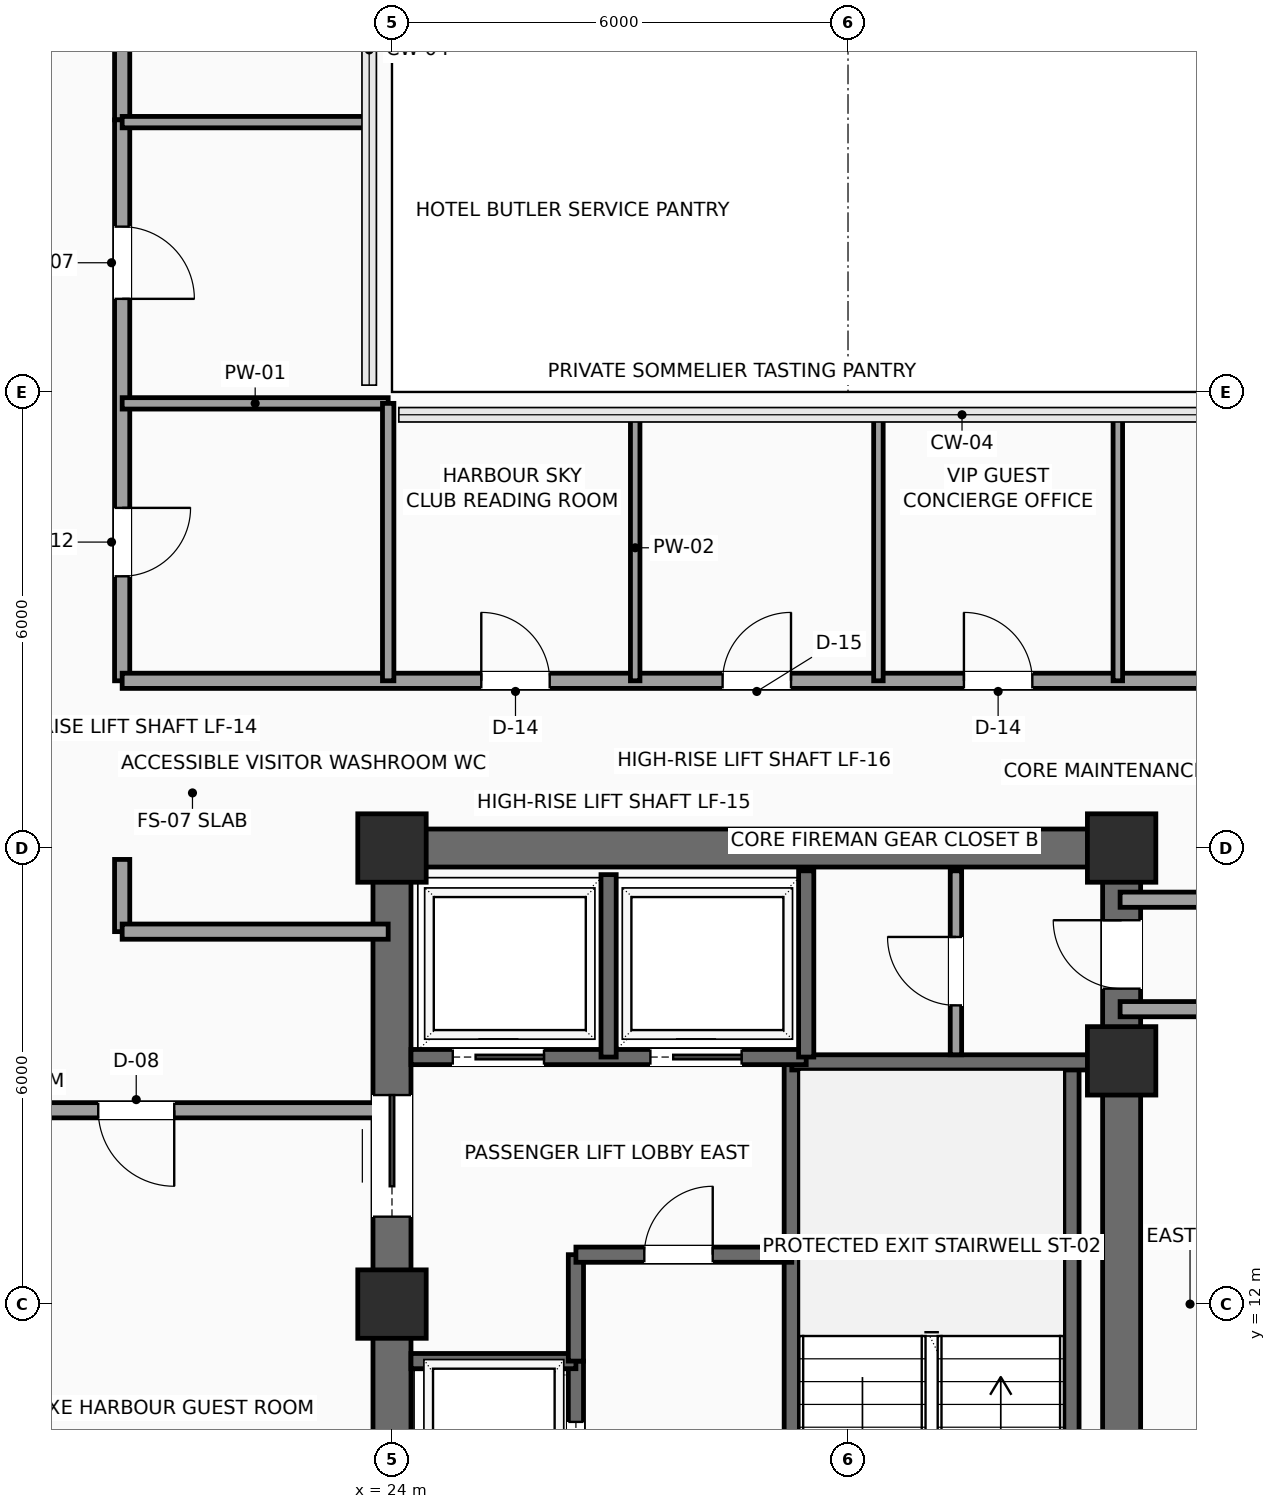
"""IFC4 building model, lengths in metres.
Left out: names, types, materials, properties, quantities, classifications, styles, units other than length and angle.
Written with IfcOpenShell. Run it as: python <this file> out.ifc"""

import sys

from ifc_helpers import new_model, si_unit, direction, frame, frame_2d, origin, origin_2d, place, context, subcontext, project, spatial, rectangle, extrude, element, fill, save


model = new_model("IFC4")
c1 = context("Model", 3, precision=1e-05, world=origin(), true_north=direction((0.0, 1.0)))
c2 = subcontext(c1, "Body", "Model", "MODEL_VIEW")
j1 = project(units=[si_unit("LENGTHUNIT", "METRE"), si_unit("PLANEANGLEUNIT", "RADIAN")], contexts=[c1])
p1 = place(None, origin())
s1 = spatial("IfcSite", under=j1, at=p1, CompositionType="ELEMENT")
p2 = place(p1, origin())
s2 = spatial("IfcBuilding", under=s1, at=p2, CompositionType="ELEMENT")
p3 = place(p2, frame((0.0, 0.0, 208.65)))
s3 = spatial("IfcBuildingStorey", under=s2, at=p3, CompositionType="ELEMENT", Elevation=208.65)
for number, where, z_axis, x_axis in (
    (1, (24.0, 12.0, 0.0), (0.0, 0.0, 1.0), (1.0, 0.0, 0.0)),
    (2, (24.0, 18.0, 0.0), (0.0, 0.0, 1.0), (1.0, 0.0, 0.0)),
    (3, (33.6, 15.2, 0.0), (0.0, 0.0, 1.0), (1.0, 0.0, 0.0)),
    (4, (33.6, 18.0, 0.0), (0.0, 0.0, 1.0), (1.0, 0.0, 0.0)),
):
    element("IfcColumn", number, at=place(p3, frame(where, z_axis=z_axis, x_axis=x_axis)), inside=s3, PredefinedType="COLUMN", context=c2, shape_type="SweptSolid", body=[
        extrude(rectangle(XDim=0.9, YDim=0.9, at=origin_2d()), origin(), (0.0, 0.0, 1.0), 3.75),
    ])
p4 = place(p3, frame((24.0, 18.0, 0.0), z_axis=(0.0, 0.0, 1.0), x_axis=(1.0, 0.0, 0.0)))
e5 = element("IfcWall", 5, at=p4, inside=s3, PredefinedType="SHEAR", context=c2, shape_type="SweptSolid", body=[
    extrude(rectangle(XDim=9.6, YDim=0.5, at=frame_2d((4.8, 0.0))), origin(), (0.0, 0.0, 1.0), 3.54),
])
p5 = place(p3, frame((24.0, 6.0, 0.0), z_axis=(0.0, 0.0, 1.0), x_axis=(0.0, 1.0, 0.0)))
e6 = element("IfcWall", 6, at=p5, inside=s3, PredefinedType="SHEAR", context=c2, shape_type="SweptSolid", body=[
    extrude(rectangle(XDim=12.0, YDim=0.5, at=frame_2d((6.0, 0.0))), origin(), (0.0, 0.0, 1.0), 3.54),
])
p6 = place(p5, frame((7.15, 0.0, 0.0)))
e7 = element("IfcOpeningElement", 7, at=p6, cuts=e6, PredefinedType="OPENING", context=c2, shape_type="SweptSolid", body=[
    extrude(rectangle(XDim=1.6, YDim=2.3, at=frame_2d((0.8, 1.15))), frame((0.0, 0.26, 0.0), z_axis=(0.0, -1.0, 0.0), x_axis=(1.0, 0.0, 0.0)), (0.0, 0.0, 1.0), 0.52),
])
p7 = place(p3, frame((33.6, 6.0, 0.0), z_axis=(0.0, 0.0, 1.0), x_axis=(0.0, 1.0, 0.0)))
e8 = element("IfcWall", 8, at=p7, inside=s3, PredefinedType="SHEAR", context=c2, shape_type="SweptSolid", body=[
    extrude(rectangle(XDim=12.0, YDim=0.5, at=frame_2d((6.0, 0.0))), origin(), (0.0, 0.0, 1.0), 3.54),
])
p8 = place(p7, frame((10.15, 0.0, 0.0)))
e9 = element("IfcOpeningElement", 9, at=p8, cuts=e8, PredefinedType="OPENING", context=c2, shape_type="SweptSolid", body=[
    extrude(rectangle(XDim=0.9, YDim=2.15, at=frame_2d((0.45, 1.075))), frame((0.0, 0.26, 0.0), z_axis=(0.0, -1.0, 0.0), x_axis=(1.0, 0.0, 0.0)), (0.0, 0.0, 1.0), 0.52),
])
p9 = place(p3, frame((29.26, 6.3, 0.0), z_axis=(0.0, 0.0, 1.0), x_axis=(0.0, 1.0, 0.0)))
e10 = element("IfcWall", 10, at=p9, inside=s3, PredefinedType="SHEAR", context=c2, shape_type="SweptSolid", body=[
    extrude(rectangle(XDim=8.88, YDim=0.2, at=frame_2d((4.44, 0.0))), origin(), (0.0, 0.0, 1.0), 3.54),
])
p10 = place(p9, frame((0.35, 0.0, 0.0)))
e11 = element("IfcOpeningElement", 11, at=p10, cuts=e10, PredefinedType="OPENING", context=c2, shape_type="SweptSolid", body=[
    extrude(rectangle(XDim=1.1, YDim=2.2, at=frame_2d((0.55, 1.1))), frame((0.0, 0.11, 0.0), z_axis=(0.0, -1.0, 0.0), x_axis=(1.0, 0.0, 0.0)), (0.0, 0.0, 1.0), 0.22),
])
p11 = place(p3, frame((32.94, 6.3, 0.0), z_axis=(0.0, 0.0, 1.0), x_axis=(0.0, 1.0, 0.0)))
e12 = element("IfcWall", 12, at=p11, inside=s3, PredefinedType="SHEAR", context=c2, shape_type="SweptSolid", body=[
    extrude(rectangle(XDim=8.88, YDim=0.2, at=frame_2d((4.44, 0.0))), origin(), (0.0, 0.0, 1.0), 3.54),
])
p12 = place(p3, frame((29.26, 15.18, 0.0), z_axis=(0.0, 0.0, 1.0), x_axis=(1.0, 0.0, 0.0)))
e13 = element("IfcWall", 13, at=p12, inside=s3, PredefinedType="SHEAR", context=c2, shape_type="SweptSolid", body=[
    extrude(rectangle(XDim=4.04, YDim=0.2, at=frame_2d((2.02, 0.0))), origin(), (0.0, 0.0, 1.0), 3.54),
])
p13 = place(p3, frame((26.42, 6.3, 0.0), z_axis=(0.0, 0.0, 1.0), x_axis=(0.0, 1.0, 0.0)))
e14 = element("IfcWall", 14, at=p13, inside=s3, PredefinedType="SHEAR", context=c2, shape_type="SweptSolid", body=[
    extrude(rectangle(XDim=4.95, YDim=0.2, at=frame_2d((2.475, 0.0))), origin(), (0.0, 0.0, 1.0), 3.54),
])
p14 = place(p13, frame((0.65, 0.0, 0.0)))
e15 = element("IfcOpeningElement", 15, at=p14, cuts=e14, PredefinedType="OPENING", context=c2, shape_type="SweptSolid", body=[
    extrude(rectangle(XDim=1.1, YDim=2.2, at=frame_2d((0.55, 1.1))), frame((0.0, 0.11, 0.0), z_axis=(0.0, -1.0, 0.0), x_axis=(1.0, 0.0, 0.0)), (0.0, 0.0, 1.0), 0.22),
])
p15 = place(p13, frame((3.05, 0.0, 0.0)))
e16 = element("IfcOpeningElement", 16, at=p15, cuts=e14, PredefinedType="OPENING", context=c2, shape_type="SweptSolid", body=[
    extrude(rectangle(XDim=1.1, YDim=2.2, at=frame_2d((0.55, 1.1))), frame((0.0, 0.11, 0.0), z_axis=(0.0, -1.0, 0.0), x_axis=(1.0, 0.0, 0.0)), (0.0, 0.0, 1.0), 0.22),
])
p16 = place(p3, frame((24.25, 11.25, 0.0), z_axis=(0.0, 0.0, 1.0), x_axis=(1.0, 0.0, 0.0)))
e17 = element("IfcWall", 17, at=p16, inside=s3, PredefinedType="SHEAR", context=c2, shape_type="SweptSolid", body=[
    extrude(rectangle(XDim=2.17, YDim=0.2, at=frame_2d((1.085, 0.0))), origin(), (0.0, 0.0, 1.0), 3.54),
])
p17 = place(p3, frame((26.42, 11.25, 0.0), z_axis=(0.0, 0.0, 1.0), x_axis=(0.0, 1.0, 0.0)))
e18 = element("IfcWall", 18, at=p17, inside=s3, PredefinedType="SHEAR", context=c2, shape_type="SweptSolid", body=[
    extrude(rectangle(XDim=1.4, YDim=0.2, at=frame_2d((0.7, 0.0))), origin(), (0.0, 0.0, 1.0), 3.54),
])
p18 = place(p3, frame((26.42, 12.65, 0.0), z_axis=(0.0, 0.0, 1.0), x_axis=(1.0, 0.0, 0.0)))
e19 = element("IfcWall", 19, at=p18, inside=s3, PredefinedType="SHEAR", context=c2, shape_type="SweptSolid", body=[
    extrude(rectangle(XDim=2.84, YDim=0.2, at=frame_2d((1.42, 0.0))), origin(), (0.0, 0.0, 1.0), 3.54),
])
p19 = place(p18, frame((0.9, 0.0, 0.0)))
e20 = element("IfcOpeningElement", 20, at=p19, cuts=e19, PredefinedType="OPENING", context=c2, shape_type="SweptSolid", body=[
    extrude(rectangle(XDim=0.9, YDim=2.15, at=frame_2d((0.45, 1.075))), frame((0.0, 0.11, 0.0), z_axis=(0.0, -1.0, 0.0), x_axis=(1.0, 0.0, 0.0)), (0.0, 0.0, 1.0), 0.22),
])
p20 = place(p3, frame((24.25, 15.25, 0.0), z_axis=(0.0, 0.0, 1.0), x_axis=(1.0, 0.0, 0.0)))
e21 = element("IfcWall", 21, at=p20, inside=s3, PredefinedType="SHEAR", context=c2, shape_type="SweptSolid", body=[
    extrude(rectangle(XDim=5.2, YDim=0.2, at=frame_2d((2.6, 0.0))), origin(), (0.0, 0.0, 1.0), 3.54),
])
p21 = place(p20, frame((0.55, 0.0, 0.0)))
e22 = element("IfcOpeningElement", 22, at=p21, cuts=e21, PredefinedType="OPENING", context=c2, shape_type="SweptSolid", body=[
    extrude(rectangle(XDim=1.2, YDim=2.2, at=frame_2d((0.6, 1.1))), frame((0.0, 0.11, 0.0), z_axis=(0.0, -1.0, 0.0), x_axis=(1.0, 0.0, 0.0)), (0.0, 0.0, 1.0), 0.22),
])
p22 = place(p20, frame((3.15, 0.0, 0.0)))
e23 = element("IfcOpeningElement", 23, at=p22, cuts=e21, PredefinedType="OPENING", context=c2, shape_type="SweptSolid", body=[
    extrude(rectangle(XDim=1.2, YDim=2.2, at=frame_2d((0.6, 1.1))), frame((0.0, 0.11, 0.0), z_axis=(0.0, -1.0, 0.0), x_axis=(1.0, 0.0, 0.0)), (0.0, 0.0, 1.0), 0.22),
])
p23 = place(p3, frame((26.85, 15.25, 0.0), z_axis=(0.0, 0.0, 1.0), x_axis=(0.0, 1.0, 0.0)))
e24 = element("IfcWall", 24, at=p23, inside=s3, PredefinedType="SHEAR", context=c2, shape_type="SweptSolid", body=[
    extrude(rectangle(XDim=2.4, YDim=0.2, at=frame_2d((1.2, 0.0))), origin(), (0.0, 0.0, 1.0), 3.54),
])
p24 = place(p3, frame((29.45, 15.25, 0.0), z_axis=(0.0, 0.0, 1.0), x_axis=(0.0, 1.0, 0.0)))
e25 = element("IfcWall", 25, at=p24, inside=s3, PredefinedType="SHEAR", context=c2, shape_type="SweptSolid", body=[
    extrude(rectangle(XDim=2.45, YDim=0.2, at=frame_2d((1.225, 0.0))), origin(), (0.0, 0.0, 1.0), 3.54),
])
p25 = place(p3, frame((31.42, 15.28, 0.0), z_axis=(0.0, 0.0, 1.0), x_axis=(0.0, 1.0, 0.0)))
e26 = element("IfcWall", 26, at=p25, inside=s3, PredefinedType="PARTITIONING", context=c2, shape_type="SweptSolid", body=[
    extrude(rectangle(XDim=2.42, YDim=0.15, at=frame_2d((1.21, 0.0))), origin(), (0.0, 0.0, 1.0), 3.54),
])
p26 = place(p25, frame((0.65, 0.0, 0.0)))
e27 = element("IfcOpeningElement", 27, at=p26, cuts=e26, PredefinedType="OPENING", context=c2, shape_type="SweptSolid", body=[
    extrude(rectangle(XDim=0.9, YDim=2.15, at=frame_2d((0.45, 1.075))), frame((0.0, 0.085, 0.0), z_axis=(0.0, -1.0, 0.0), x_axis=(1.0, 0.0, 0.0)), (0.0, 0.0, 1.0), 0.17),
])
p27 = place(p3, frame((20.45, 30.25, 0.0), z_axis=(0.0, 0.0, 1.0), x_axis=(0.0, -1.0, 0.0)))
e28 = element("IfcWall", 28, at=p27, inside=s3, PredefinedType="PARTITIONING", context=c2, shape_type="SweptSolid", body=[
    extrude(rectangle(XDim=2.67, YDim=0.2, at=frame_2d((1.335, 0.0))), origin(), (0.0, 0.0, 1.0), 3.54),
])
p28 = place(p3, frame((20.45, 27.58, 0.0), z_axis=(0.0, 0.0, 1.0), x_axis=(0.0, -1.0, 0.0)))
e29 = element("IfcWall", 29, at=p28, inside=s3, PredefinedType="PARTITIONING", context=c2, shape_type="SweptSolid", body=[
    extrude(rectangle(XDim=7.38, YDim=0.2, at=frame_2d((3.69, 0.0))), origin(), (0.0, 0.0, 1.0), 3.54),
])
p29 = place(p28, frame((5.105, 0.0, 0.0)))
e30 = element("IfcOpeningElement", 30, at=p29, cuts=e29, PredefinedType="OPENING", context=c2, shape_type="SweptSolid", body=[
    extrude(rectangle(XDim=0.9, YDim=2.1, at=frame_2d((0.45, 1.05))), frame((0.0, 0.11, 0.0), z_axis=(0.0, -1.0, 0.0), x_axis=(1.0, 0.0, 0.0)), (0.0, 0.0, 1.0), 0.22),
])
p30 = place(p28, frame((1.405, 0.0, 0.0)))
e31 = element("IfcOpeningElement", 31, at=p30, cuts=e29, PredefinedType="OPENING", context=c2, shape_type="SweptSolid", body=[
    extrude(rectangle(XDim=0.95, YDim=2.15, at=frame_2d((0.475, 1.075))), frame((0.0, 0.11, 0.0), z_axis=(0.0, -1.0, 0.0), x_axis=(1.0, 0.0, 0.0)), (0.0, 0.0, 1.0), 0.22),
])
p31 = place(p3, frame((20.45, 20.2, 0.0), z_axis=(0.0, 0.0, 1.0), x_axis=(1.0, 0.0, 0.0)))
e32 = element("IfcWall", 32, at=p31, inside=s3, PredefinedType="PARTITIONING", context=c2, shape_type="SweptSolid", body=[
    extrude(rectangle(XDim=15.7, YDim=0.2, at=frame_2d((7.85, 0.0))), origin(), (0.0, 0.0, 1.0), 3.54),
])
p32 = place(p31, frame((4.725, 0.0, 0.0)))
e33 = element("IfcOpeningElement", 33, at=p32, cuts=e32, PredefinedType="OPENING", context=c2, shape_type="SweptSolid", body=[
    extrude(rectangle(XDim=0.9, YDim=2.1, at=frame_2d((0.45, 1.05))), frame((0.0, 0.11, 0.0), z_axis=(0.0, -1.0, 0.0), x_axis=(1.0, 0.0, 0.0)), (0.0, 0.0, 1.0), 0.22),
])
p33 = place(p31, frame((7.9, 0.0, 0.0)))
e34 = element("IfcOpeningElement", 34, at=p33, cuts=e32, PredefinedType="OPENING", context=c2, shape_type="SweptSolid", body=[
    extrude(rectangle(XDim=0.9, YDim=2.1, at=frame_2d((0.45, 1.05))), frame((0.0, 0.11, 0.0), z_axis=(0.0, -1.0, 0.0), x_axis=(1.0, 0.0, 0.0)), (0.0, 0.0, 1.0), 0.22),
])
p34 = place(p31, frame((11.075, 0.0, 0.0)))
e35 = element("IfcOpeningElement", 35, at=p34, cuts=e32, PredefinedType="OPENING", context=c2, shape_type="SweptSolid", body=[
    extrude(rectangle(XDim=0.9, YDim=2.1, at=frame_2d((0.45, 1.05))), frame((0.0, 0.11, 0.0), z_axis=(0.0, -1.0, 0.0), x_axis=(1.0, 0.0, 0.0)), (0.0, 0.0, 1.0), 0.22),
])
for number, where, z_axis, x_axis in (
    (36, (36.15, 15.88, 0.0), (0.0, 0.0, 1.0), (-1.0, 0.0, 0.0)),
    (37, (33.58, 17.32, 0.0), (0.0, 0.0, 1.0), (1.0, 0.0, 0.0)),
):
    element("IfcWall", number, at=place(p3, frame(where, z_axis=z_axis, x_axis=x_axis)), inside=s3, PredefinedType="PARTITIONING", context=c2, shape_type="SweptSolid", body=[
        extrude(rectangle(XDim=2.57, YDim=0.2, at=frame_2d((1.285, 0.0))), origin(), (0.0, 0.0, 1.0), 3.54),
    ])
p35 = place(p3, frame((20.45, 17.85, 0.0), z_axis=(0.0, 0.0, 1.0), x_axis=(0.0, -1.0, 0.0)))
e38 = element("IfcWall", 38, at=p35, inside=s3, PredefinedType="PARTITIONING", context=c2, shape_type="SweptSolid", body=[
    extrude(rectangle(XDim=0.95, YDim=0.2, at=frame_2d((0.475, 0.0))), origin(), (0.0, 0.0, 1.0), 3.54),
])
p36 = place(p3, frame((20.45, 16.9, 0.0), z_axis=(0.0, 0.0, 1.0), x_axis=(1.0, 0.0, 0.0)))
e39 = element("IfcWall", 39, at=p36, inside=s3, PredefinedType="PARTITIONING", context=c2, shape_type="SweptSolid", body=[
    extrude(rectangle(XDim=3.5, YDim=0.2, at=frame_2d((1.75, 0.0))), origin(), (0.0, 0.0, 1.0), 3.54),
])
p37 = place(p3, frame((23.95, 14.55, 0.0), z_axis=(0.0, 0.0, 1.0), x_axis=(-1.0, 0.0, 0.0)))
e40 = element("IfcWall", 40, at=p37, inside=s3, PredefinedType="PARTITIONING", context=c2, shape_type="SweptSolid", body=[
    extrude(rectangle(XDim=9.0, YDim=0.2, at=frame_2d((4.5, 0.0))), origin(), (0.0, 0.0, 1.0), 3.54),
])
p38 = place(p37, frame((2.815, 0.0, 0.0)))
e41 = element("IfcOpeningElement", 41, at=p38, cuts=e40, PredefinedType="OPENING", context=c2, shape_type="SweptSolid", body=[
    extrude(rectangle(XDim=1.0, YDim=2.2, at=frame_2d((0.5, 1.1))), frame((0.0, 0.11, 0.0), z_axis=(0.0, -1.0, 0.0), x_axis=(1.0, 0.0, 0.0)), (0.0, 0.0, 1.0), 0.22),
])
p39 = place(p3, frame((20.45, 23.85, 0.0), z_axis=(0.0, 0.0, 1.0), x_axis=(1.0, 0.0, 0.0)))
e42 = element("IfcWall", 42, at=p39, inside=s3, PredefinedType="PARTITIONING", context=c2, shape_type="SweptSolid", body=[
    extrude(rectangle(XDim=3.5, YDim=0.15, at=frame_2d((1.75, 0.0))), origin(), (0.0, 0.0, 1.0), 3.54),
])
p40 = place(p3, frame((23.95, 20.2, 0.0), z_axis=(0.0, 0.0, 1.0), x_axis=(0.0, 1.0, 0.0)))
e43 = element("IfcWall", 43, at=p40, inside=s3, PredefinedType="PARTITIONING", context=c2, shape_type="SweptSolid", body=[
    extrude(rectangle(XDim=3.65, YDim=0.15, at=frame_2d((1.825, 0.0))), origin(), (0.0, 0.0, 1.0), 3.54),
])
p41 = place(p3, frame((20.45, 27.55, 0.0), z_axis=(0.0, 0.0, 1.0), x_axis=(1.0, 0.0, 0.0)))
e44 = element("IfcWall", 44, at=p41, inside=s3, PredefinedType="PARTITIONING", context=c2, shape_type="SweptSolid", body=[
    extrude(rectangle(XDim=3.25, YDim=0.15, at=frame_2d((1.625, 0.0))), origin(), (0.0, 0.0, 1.0), 3.54),
])
for number, where, z_axis, x_axis in (
    (45, (27.2, 20.2, 0.0), (0.0, 0.0, 1.0), (0.0, 1.0, 0.0)),
    (46, (30.4, 20.2, 0.0), (0.0, 0.0, 1.0), (0.0, 1.0, 0.0)),
    (47, (33.55, 20.2, 0.0), (0.0, 0.0, 1.0), (0.0, 1.0, 0.0)),
):
    element("IfcWall", number, at=place(p3, frame(where, z_axis=z_axis, x_axis=x_axis)), inside=s3, PredefinedType="PARTITIONING", context=c2, shape_type="SweptSolid", body=[
        extrude(rectangle(XDim=3.5, YDim=0.125, at=frame_2d((1.75, 0.0))), origin(), (0.0, 0.0, 1.0), 3.54),
    ])
p42 = place(p6, origin())
e48 = element("IfcDoor", 48, at=p42, inside=s3, OperationType="DOUBLE_DOOR_SLIDING", PredefinedType="DOOR", context=c2, shape_type="SweptSolid", body=[
    extrude(rectangle(XDim=1.6, YDim=2.3, at=frame_2d((0.8, 1.15))), frame((0.0, 0.025, 0.0), z_axis=(0.0, -1.0, 0.0), x_axis=(1.0, 0.0, 0.0)), (0.0, 0.0, 1.0), 0.05),
])
fill(e7, e48)
p43 = place(p8, origin())
e49 = element("IfcDoor", 49, at=p43, inside=s3, OperationType="SINGLE_SWING_RIGHT", PredefinedType="DOOR", context=c2, shape_type="SweptSolid", body=[
    extrude(rectangle(XDim=0.9, YDim=2.15, at=frame_2d((0.45, 1.075))), frame((0.0, 0.025, 0.0), z_axis=(0.0, -1.0, 0.0), x_axis=(1.0, 0.0, 0.0)), (0.0, 0.0, 1.0), 0.05),
])
fill(e9, e49)
p44 = place(p15, origin())
e50 = element("IfcDoor", 50, at=p44, inside=s3, OperationType="SLIDING_TO_LEFT", PredefinedType="DOOR", context=c2, shape_type="SweptSolid", body=[
    extrude(rectangle(XDim=1.1, YDim=2.2, at=frame_2d((0.55, 1.1))), frame((0.0, 0.025, 0.0), z_axis=(0.0, -1.0, 0.0), x_axis=(1.0, 0.0, 0.0)), (0.0, 0.0, 1.0), 0.05),
])
fill(e16, e50)
p45 = place(p19, origin())
e51 = element("IfcDoor", 51, at=p45, inside=s3, OperationType="SINGLE_SWING_RIGHT", PredefinedType="DOOR", context=c2, shape_type="SweptSolid", body=[
    extrude(rectangle(XDim=0.9, YDim=2.15, at=frame_2d((0.45, 1.075))), frame((0.0, 0.025, 0.0), z_axis=(0.0, -1.0, 0.0), x_axis=(1.0, 0.0, 0.0)), (0.0, 0.0, 1.0), 0.05),
])
fill(e20, e51)
p46 = place(p21, origin())
e52 = element("IfcDoor", 52, at=p46, inside=s3, OperationType="SLIDING_TO_RIGHT", PredefinedType="DOOR", context=c2, shape_type="SweptSolid", body=[
    extrude(rectangle(XDim=1.2, YDim=2.2, at=frame_2d((0.6, 1.1))), frame((0.0, 0.025, 0.0), z_axis=(0.0, -1.0, 0.0), x_axis=(1.0, 0.0, 0.0)), (0.0, 0.0, 1.0), 0.05),
])
fill(e22, e52)
p47 = place(p22, origin())
e53 = element("IfcDoor", 53, at=p47, inside=s3, OperationType="SLIDING_TO_RIGHT", PredefinedType="DOOR", context=c2, shape_type="SweptSolid", body=[
    extrude(rectangle(XDim=1.2, YDim=2.2, at=frame_2d((0.6, 1.1))), frame((0.0, 0.025, 0.0), z_axis=(0.0, -1.0, 0.0), x_axis=(1.0, 0.0, 0.0)), (0.0, 0.0, 1.0), 0.05),
])
fill(e23, e53)
p48 = place(p26, origin())
e54 = element("IfcDoor", 54, at=p48, inside=s3, OperationType="SINGLE_SWING_RIGHT", PredefinedType="DOOR", context=c2, shape_type="SweptSolid", body=[
    extrude(rectangle(XDim=0.9, YDim=2.15, at=frame_2d((0.45, 1.075))), frame((0.0, 0.025, 0.0), z_axis=(0.0, -1.0, 0.0), x_axis=(1.0, 0.0, 0.0)), (0.0, 0.0, 1.0), 0.05),
])
fill(e27, e54)
p49 = place(p29, origin())
e55 = element("IfcDoor", 55, at=p49, inside=s3, OperationType="SINGLE_SWING_LEFT", PredefinedType="DOOR", context=c2, shape_type="SweptSolid", body=[
    extrude(rectangle(XDim=0.9, YDim=2.1, at=frame_2d((0.45, 1.05))), frame((0.0, 0.025, 0.0), z_axis=(0.0, -1.0, 0.0), x_axis=(1.0, 0.0, 0.0)), (0.0, 0.0, 1.0), 0.05),
])
fill(e30, e55)
p50 = place(p30, origin())
e56 = element("IfcDoor", 56, at=p50, inside=s3, OperationType="SINGLE_SWING_RIGHT", PredefinedType="DOOR", context=c2, shape_type="SweptSolid", body=[
    extrude(rectangle(XDim=0.95, YDim=2.15, at=frame_2d((0.475, 1.075))), frame((0.0, 0.025, 0.0), z_axis=(0.0, -1.0, 0.0), x_axis=(1.0, 0.0, 0.0)), (0.0, 0.0, 1.0), 0.05),
])
fill(e31, e56)
p51 = place(p32, origin())
e57 = element("IfcDoor", 57, at=p51, inside=s3, OperationType="SINGLE_SWING_LEFT", PredefinedType="DOOR", context=c2, shape_type="SweptSolid", body=[
    extrude(rectangle(XDim=0.9, YDim=2.1, at=frame_2d((0.45, 1.05))), frame((0.0, 0.025, 0.0), z_axis=(0.0, -1.0, 0.0), x_axis=(1.0, 0.0, 0.0)), (0.0, 0.0, 1.0), 0.05),
])
fill(e33, e57)
p52 = place(p33, origin())
e58 = element("IfcDoor", 58, at=p52, inside=s3, OperationType="SINGLE_SWING_RIGHT", PredefinedType="DOOR", context=c2, shape_type="SweptSolid", body=[
    extrude(rectangle(XDim=0.9, YDim=2.1, at=frame_2d((0.45, 1.05))), frame((0.0, 0.025, 0.0), z_axis=(0.0, -1.0, 0.0), x_axis=(1.0, 0.0, 0.0)), (0.0, 0.0, 1.0), 0.05),
])
fill(e34, e58)
p53 = place(p34, origin())
e59 = element("IfcDoor", 59, at=p53, inside=s3, OperationType="SINGLE_SWING_LEFT", PredefinedType="DOOR", context=c2, shape_type="SweptSolid", body=[
    extrude(rectangle(XDim=0.9, YDim=2.1, at=frame_2d((0.45, 1.05))), frame((0.0, 0.025, 0.0), z_axis=(0.0, -1.0, 0.0), x_axis=(1.0, 0.0, 0.0)), (0.0, 0.0, 1.0), 0.05),
])
fill(e35, e59)
p54 = place(p38, origin())
e60 = element("IfcDoor", 60, at=p54, inside=s3, OperationType="SINGLE_SWING_LEFT", PredefinedType="DOOR", context=c2, shape_type="SweptSolid", body=[
    extrude(rectangle(XDim=1.0, YDim=2.2, at=frame_2d((0.5, 1.1))), frame((0.0, 0.025, 0.0), z_axis=(0.0, -1.0, 0.0), x_axis=(1.0, 0.0, 0.0)), (0.0, 0.0, 1.0), 0.05),
])
fill(e41, e60)
save(model, sys.argv[1])
